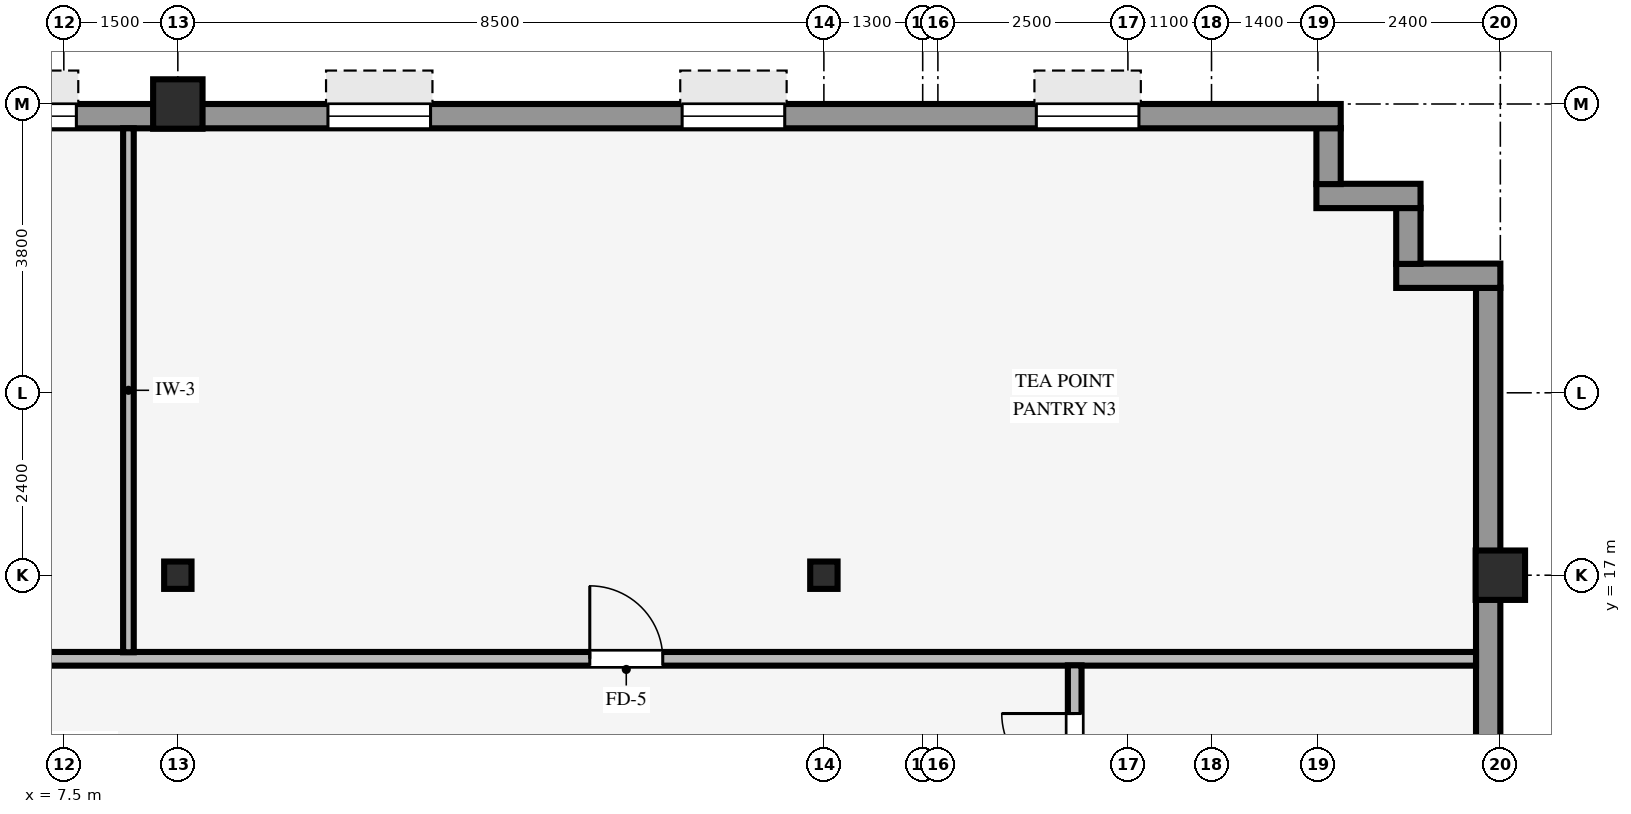
"""IFC4 building model, lengths in metres.
Left out: names, types, materials, properties, quantities, classifications, styles, units other than length and angle.
Written with IfcOpenShell. Run it as: python <this file> out.ifc"""

import sys

from ifc_helpers import new_model, si_unit, direction, frame, frame_2d, origin, origin_2d, place, context, subcontext, project, spatial, rectangle, hollow_rectangle, i_section, extrude, source, transform, mapped, element, fill, save


model = new_model("IFC4")
c1 = context("Model", 3, precision=1e-05, world=origin(), true_north=direction((0.0, 1.0)))
c2 = subcontext(c1, "Body", "Model", "MODEL_VIEW")
j1 = project(units=[si_unit("LENGTHUNIT", "METRE"), si_unit("PLANEANGLEUNIT", "RADIAN")], contexts=[c1])
p1 = place(None, origin())
s1 = spatial("IfcSite", under=j1, at=p1, CompositionType="ELEMENT")
p2 = place(p1, origin())
s2 = spatial("IfcBuilding", under=s1, at=p2, CompositionType="ELEMENT")
p3 = place(p2, frame((0.0, 0.0, 149.4)))
s3 = spatial("IfcBuildingStorey", under=s2, at=p3, CompositionType="ELEMENT", Elevation=149.4)
for number, where, z_axis, x_axis in (
    (1, (26.4, 17.0, 0.0), (0.0, 0.0, 1.0), (1.0, 0.0, 0.0)),
    (2, (9.0, 23.2, 0.0), (0.0, 0.0, 1.0), (1.0, 0.0, 0.0)),
):
    element("IfcColumn", number, at=place(p3, frame(where, z_axis=z_axis, x_axis=x_axis)), inside=s3, PredefinedType="COLUMN", context=c2, shape_type="SweptSolid", body=[
        extrude(hollow_rectangle(XDim=0.65, YDim=0.65, WallThickness=0.04, InnerFilletRadius=0.04, OuterFilletRadius=0.08, at=origin_2d()), origin(), (0.0, 0.0, 1.0), 3.37),
    ])
for number, where, z_axis, x_axis in (
    (3, (9.0, 17.0, 0.0), (0.0, 0.0, 1.0), (1.0, 0.0, 0.0)),
    (4, (17.5, 17.0, 0.0), (0.0, 0.0, 1.0), (1.0, 0.0, 0.0)),
):
    element("IfcColumn", number, at=place(p3, frame(where, z_axis=z_axis, x_axis=x_axis)), inside=s3, PredefinedType="COLUMN", context=c2, shape_type="SweptSolid", body=[
        extrude(i_section(OverallWidth=0.36, OverallDepth=0.36, WebThickness=0.021, FlangeThickness=0.021, FilletRadius=0.018, at=origin_2d()), origin(), (0.0, 0.0, 1.0), 3.37),
    ])
p4 = place(p3, frame((26.24, -20.784, 0.0), z_axis=(0.0, 0.0, 1.0), x_axis=(0.0, 1.0, 0.0)))
e5 = element("IfcWall", 5, at=p4, inside=s3, PredefinedType="STANDARD", context=c2, shape_type="SweptSolid", body=[
    extrude(rectangle(XDim=41.568, YDim=0.32, at=frame_2d((20.784, 0.0))), origin(), (0.0, 0.0, 1.0), 2.705),
])
p5 = place(p4, frame((7.369, 0.0, 0.8)))
e6 = element("IfcOpeningElement", 6, at=p5, cuts=e5, PredefinedType="OPENING", context=c2, shape_type="SweptSolid", body=[
    extrude(rectangle(XDim=2.1, YDim=1.56, at=frame_2d((1.05, 0.78))), frame((0.0, 0.17, 0.0), z_axis=(0.0, -1.0, 0.0), x_axis=(1.0, 0.0, 0.0)), (0.0, 0.0, 1.0), 0.34),
])
p6 = place(p4, frame((12.315, 0.0, 0.8)))
e7 = element("IfcOpeningElement", 7, at=p6, cuts=e5, PredefinedType="OPENING", context=c2, shape_type="SweptSolid", body=[
    extrude(rectangle(XDim=2.1, YDim=1.56, at=frame_2d((1.05, 0.78))), frame((0.0, 0.17, 0.0), z_axis=(0.0, -1.0, 0.0), x_axis=(1.0, 0.0, 0.0)), (0.0, 0.0, 1.0), 0.34),
])
p7 = place(p4, frame((17.261, 0.0, 0.8)))
e8 = element("IfcOpeningElement", 8, at=p7, cuts=e5, PredefinedType="OPENING", context=c2, shape_type="SweptSolid", body=[
    extrude(rectangle(XDim=2.1, YDim=1.56, at=frame_2d((1.05, 0.78))), frame((0.0, 0.17, 0.0), z_axis=(0.0, -1.0, 0.0), x_axis=(1.0, 0.0, 0.0)), (0.0, 0.0, 1.0), 0.34),
])
p8 = place(p4, frame((22.207, 0.0, 0.8)))
e9 = element("IfcOpeningElement", 9, at=p8, cuts=e5, PredefinedType="OPENING", context=c2, shape_type="SweptSolid", body=[
    extrude(rectangle(XDim=2.1, YDim=1.56, at=frame_2d((1.05, 0.78))), frame((0.0, 0.17, 0.0), z_axis=(0.0, -1.0, 0.0), x_axis=(1.0, 0.0, 0.0)), (0.0, 0.0, 1.0), 0.34),
])
p9 = place(p4, frame((27.153, 0.0, 0.8)))
e10 = element("IfcOpeningElement", 10, at=p9, cuts=e5, PredefinedType="OPENING", context=c2, shape_type="SweptSolid", body=[
    extrude(rectangle(XDim=2.1, YDim=1.56, at=frame_2d((1.05, 0.78))), frame((0.0, 0.17, 0.0), z_axis=(0.0, -1.0, 0.0), x_axis=(1.0, 0.0, 0.0)), (0.0, 0.0, 1.0), 0.34),
])
p10 = place(p4, frame((32.099, 0.0, 0.8)))
e11 = element("IfcOpeningElement", 11, at=p10, cuts=e5, PredefinedType="OPENING", context=c2, shape_type="SweptSolid", body=[
    extrude(rectangle(XDim=2.1, YDim=1.56, at=frame_2d((1.05, 0.78))), frame((0.0, 0.17, 0.0), z_axis=(0.0, -1.0, 0.0), x_axis=(1.0, 0.0, 0.0)), (0.0, 0.0, 1.0), 0.34),
])
p11 = place(p3, frame((25.03, 20.94, 0.0), z_axis=(0.0, 0.0, 1.0), x_axis=(1.0, 0.0, 0.0)))
e12 = element("IfcWall", 12, at=p11, inside=s3, PredefinedType="STANDARD", context=c2, shape_type="SweptSolid", body=[
    extrude(rectangle(XDim=1.37, YDim=0.32, at=frame_2d((0.685, 0.0))), origin(), (0.0, 0.0, 1.0), 3.36),
])
p12 = place(p3, frame((25.19, 21.096, 0.0), z_axis=(0.0, 0.0, 1.0), x_axis=(0.0, 1.0, 0.0)))
e13 = element("IfcWall", 13, at=p12, inside=s3, PredefinedType="STANDARD", context=c2, shape_type="SweptSolid", body=[
    extrude(rectangle(XDim=0.738, YDim=0.32, at=frame_2d((0.369, 0.0))), origin(), (0.0, 0.0, 1.0), 3.36),
])
p13 = place(p3, frame((23.98, 21.99, 0.0), z_axis=(0.0, 0.0, 1.0), x_axis=(1.0, 0.0, 0.0)))
e14 = element("IfcWall", 14, at=p13, inside=s3, PredefinedType="STANDARD", context=c2, shape_type="SweptSolid", body=[
    extrude(rectangle(XDim=1.37, YDim=0.32, at=frame_2d((0.685, 0.0))), origin(), (0.0, 0.0, 1.0), 3.36),
])
p14 = place(p3, frame((24.14, 22.146, 0.0), z_axis=(0.0, 0.0, 1.0), x_axis=(0.0, 1.0, 0.0)))
e15 = element("IfcWall", 15, at=p14, inside=s3, PredefinedType="STANDARD", context=c2, shape_type="SweptSolid", body=[
    extrude(rectangle(XDim=0.738, YDim=0.32, at=frame_2d((0.369, 0.0))), origin(), (0.0, 0.0, 1.0), 3.36),
])
p15 = place(p3, frame((-24.3, 23.04, 0.0), z_axis=(0.0, 0.0, 1.0), x_axis=(1.0, 0.0, 0.0)))
e16 = element("IfcWall", 16, at=p15, inside=s3, PredefinedType="STANDARD", context=c2, shape_type="SweptSolid", body=[
    extrude(rectangle(XDim=48.6, YDim=0.32, at=frame_2d((24.3, 0.0))), origin(), (0.0, 0.0, 1.0), 2.705),
])
p16 = place(p15, frame((2.655, 0.0, 0.8)))
e17 = element("IfcOpeningElement", 17, at=p16, cuts=e16, PredefinedType="OPENING", context=c2, shape_type="SweptSolid", body=[
    extrude(rectangle(XDim=1.35, YDim=1.56, at=frame_2d((0.675, 0.78))), frame((0.0, 0.17, 0.0), z_axis=(0.0, -1.0, 0.0), x_axis=(1.0, 0.0, 0.0)), (0.0, 0.0, 1.0), 0.34),
])
p17 = place(p15, frame((7.315, 0.0, 0.8)))
e18 = element("IfcOpeningElement", 18, at=p17, cuts=e16, PredefinedType="OPENING", context=c2, shape_type="SweptSolid", body=[
    extrude(rectangle(XDim=1.35, YDim=1.56, at=frame_2d((0.675, 0.78))), frame((0.0, 0.17, 0.0), z_axis=(0.0, -1.0, 0.0), x_axis=(1.0, 0.0, 0.0)), (0.0, 0.0, 1.0), 0.34),
])
p18 = place(p15, frame((11.975, 0.0, 0.8)))
e19 = element("IfcOpeningElement", 19, at=p18, cuts=e16, PredefinedType="OPENING", context=c2, shape_type="SweptSolid", body=[
    extrude(rectangle(XDim=1.35, YDim=1.56, at=frame_2d((0.675, 0.78))), frame((0.0, 0.17, 0.0), z_axis=(0.0, -1.0, 0.0), x_axis=(1.0, 0.0, 0.0)), (0.0, 0.0, 1.0), 0.34),
])
p19 = place(p15, frame((16.185, 0.0, 0.8)))
e20 = element("IfcOpeningElement", 20, at=p19, cuts=e16, PredefinedType="OPENING", context=c2, shape_type="SweptSolid", body=[
    extrude(rectangle(XDim=1.35, YDim=1.56, at=frame_2d((0.675, 0.78))), frame((0.0, 0.17, 0.0), z_axis=(0.0, -1.0, 0.0), x_axis=(1.0, 0.0, 0.0)), (0.0, 0.0, 1.0), 0.34),
])
p20 = place(p15, frame((21.295, 0.0, 0.8)))
e21 = element("IfcOpeningElement", 21, at=p20, cuts=e16, PredefinedType="OPENING", context=c2, shape_type="SweptSolid", body=[
    extrude(rectangle(XDim=1.35, YDim=1.56, at=frame_2d((0.675, 0.78))), frame((0.0, 0.17, 0.0), z_axis=(0.0, -1.0, 0.0), x_axis=(1.0, 0.0, 0.0)), (0.0, 0.0, 1.0), 0.34),
])
p21 = place(p15, frame((25.955, 0.0, 0.8)))
e22 = element("IfcOpeningElement", 22, at=p21, cuts=e16, PredefinedType="OPENING", context=c2, shape_type="SweptSolid", body=[
    extrude(rectangle(XDim=1.35, YDim=1.56, at=frame_2d((0.675, 0.78))), frame((0.0, 0.17, 0.0), z_axis=(0.0, -1.0, 0.0), x_axis=(1.0, 0.0, 0.0)), (0.0, 0.0, 1.0), 0.34),
])
p22 = place(p15, frame((30.615, 0.0, 0.8)))
e23 = element("IfcOpeningElement", 23, at=p22, cuts=e16, PredefinedType="OPENING", context=c2, shape_type="SweptSolid", body=[
    extrude(rectangle(XDim=1.35, YDim=1.56, at=frame_2d((0.675, 0.78))), frame((0.0, 0.17, 0.0), z_axis=(0.0, -1.0, 0.0), x_axis=(1.0, 0.0, 0.0)), (0.0, 0.0, 1.0), 0.34),
])
p23 = place(p15, frame((35.275, 0.0, 0.8)))
e24 = element("IfcOpeningElement", 24, at=p23, cuts=e16, PredefinedType="OPENING", context=c2, shape_type="SweptSolid", body=[
    extrude(rectangle(XDim=1.35, YDim=1.56, at=frame_2d((0.675, 0.78))), frame((0.0, 0.17, 0.0), z_axis=(0.0, -1.0, 0.0), x_axis=(1.0, 0.0, 0.0)), (0.0, 0.0, 1.0), 0.34),
])
p24 = place(p15, frame((39.935, 0.0, 0.8)))
e25 = element("IfcOpeningElement", 25, at=p24, cuts=e16, PredefinedType="OPENING", context=c2, shape_type="SweptSolid", body=[
    extrude(rectangle(XDim=1.35, YDim=1.56, at=frame_2d((0.675, 0.78))), frame((0.0, 0.17, 0.0), z_axis=(0.0, -1.0, 0.0), x_axis=(1.0, 0.0, 0.0)), (0.0, 0.0, 1.0), 0.34),
])
p25 = place(p15, frame((44.595, 0.0, 0.8)))
e26 = element("IfcOpeningElement", 26, at=p25, cuts=e16, PredefinedType="OPENING", context=c2, shape_type="SweptSolid", body=[
    extrude(rectangle(XDim=1.35, YDim=1.56, at=frame_2d((0.675, 0.78))), frame((0.0, 0.17, 0.0), z_axis=(0.0, -1.0, 0.0), x_axis=(1.0, 0.0, 0.0)), (0.0, 0.0, 1.0), 0.34),
])
p26 = place(p3, frame((-26.08, 15.9, 0.0), z_axis=(0.0, 0.0, 1.0), x_axis=(1.0, 0.0, 0.0)))
e27 = element("IfcWall", 27, at=p26, inside=s3, PredefinedType="PARTITIONING", context=c2, shape_type="SweptSolid", body=[
    extrude(rectangle(XDim=52.16, YDim=0.18, at=frame_2d((26.08, 0.0))), origin(), (0.0, 0.0, 1.0), 3.36),
])
p27 = place(p26, frame((26.72, 0.0, 0.0)))
e28 = element("IfcOpeningElement", 28, at=p27, cuts=e27, PredefinedType="OPENING", context=c2, shape_type="SweptSolid", body=[
    extrude(rectangle(XDim=0.96, YDim=2.1, at=frame_2d((0.48, 1.05))), frame((0.0, 0.1, 0.0), z_axis=(0.0, -1.0, 0.0), x_axis=(1.0, 0.0, 0.0)), (0.0, 0.0, 1.0), 0.2),
])
p28 = place(p26, frame((40.5, 0.0, 0.0)))
e29 = element("IfcOpeningElement", 29, at=p28, cuts=e27, PredefinedType="OPENING", context=c2, shape_type="SweptSolid", body=[
    extrude(rectangle(XDim=0.96, YDim=2.1, at=frame_2d((0.48, 1.05))), frame((0.0, 0.1, 0.0), z_axis=(0.0, -1.0, 0.0), x_axis=(1.0, 0.0, 0.0)), (0.0, 0.0, 1.0), 0.2),
])
p29 = place(p26, frame((13.61, 0.0, 0.0)))
e30 = element("IfcOpeningElement", 30, at=p29, cuts=e27, PredefinedType="OPENING", context=c2, shape_type="SweptSolid", body=[
    extrude(rectangle(XDim=0.96, YDim=2.1, at=frame_2d((0.48, 1.05))), frame((0.0, 0.1, 0.0), z_axis=(0.0, -1.0, 0.0), x_axis=(1.0, 0.0, 0.0)), (0.0, 0.0, 1.0), 0.2),
])
p30 = place(p3, frame((8.35, 15.986, 0.0), z_axis=(0.0, 0.0, 1.0), x_axis=(0.0, 1.0, 0.0)))
e31 = element("IfcWall", 31, at=p30, inside=s3, PredefinedType="PARTITIONING", context=c2, shape_type="SweptSolid", body=[
    extrude(rectangle(XDim=6.894, YDim=0.14, at=frame_2d((3.447, 0.0))), origin(), (0.0, 0.0, 1.0), 3.36),
])
p31 = place(p3, frame((20.8, 13.586, 0.0), z_axis=(0.0, 0.0, 1.0), x_axis=(0.0, 1.0, 0.0)))
e32 = element("IfcWall", 32, at=p31, inside=s3, PredefinedType="PARTITIONING", context=c2, shape_type="SweptSolid", body=[
    extrude(rectangle(XDim=2.228, YDim=0.18, at=frame_2d((1.114, 0.0))), origin(), (0.0, 0.0, 1.0), 3.36),
])
p32 = place(p31, frame((0.634, 0.0, 0.0)))
e33 = element("IfcOpeningElement", 33, at=p32, cuts=e32, PredefinedType="OPENING", context=c2, shape_type="SweptSolid", body=[
    extrude(rectangle(XDim=0.96, YDim=2.1, at=frame_2d((0.48, 1.05))), frame((0.0, 0.1, 0.0), z_axis=(0.0, -1.0, 0.0), x_axis=(1.0, 0.0, 0.0)), (0.0, 0.0, 1.0), 0.2),
])
m1 = source(origin(), c2, "Body", "SweptSolid", [
    extrude(rectangle(XDim=1.35, YDim=1.56, at=frame_2d((0.675, 0.78))), frame((0.0, 0.03, 0.0), z_axis=(0.0, -1.0, 0.0), x_axis=(1.0, 0.0, 0.0)), (0.0, 0.0, 1.0), 0.06),
])
p33 = place(p22, origin())
e34 = element("IfcWindow", 34, at=p33, inside=s3, PartitioningType="SINGLE_PANEL", PredefinedType="WINDOW", context=c2, shape_type="MappedRepresentation", body=[
    mapped(m1, transform((0.0, 0.0, 0.0), scale=1.0)),
])
fill(e23, e34)
p34 = place(p23, origin())
e35 = element("IfcWindow", 35, at=p34, inside=s3, PartitioningType="SINGLE_PANEL", PredefinedType="WINDOW", context=c2, shape_type="MappedRepresentation", body=[
    mapped(m1, transform((0.0, 0.0, 0.0), scale=1.0)),
])
fill(e24, e35)
p35 = place(p24, origin())
e36 = element("IfcWindow", 36, at=p35, inside=s3, PartitioningType="SINGLE_PANEL", PredefinedType="WINDOW", context=c2, shape_type="MappedRepresentation", body=[
    mapped(m1, transform((0.0, 0.0, 0.0), scale=1.0)),
])
fill(e25, e36)
p36 = place(p25, origin())
e37 = element("IfcWindow", 37, at=p36, inside=s3, PartitioningType="SINGLE_PANEL", PredefinedType="WINDOW", context=c2, shape_type="MappedRepresentation", body=[
    mapped(m1, transform((0.0, 0.0, 0.0), scale=1.0)),
])
fill(e26, e37)
m2 = source(origin(), c2, "Body", "SweptSolid", [
    extrude(rectangle(XDim=0.96, YDim=2.1, at=frame_2d((0.48, 1.05))), frame((0.0, 0.025, 0.0), z_axis=(0.0, -1.0, 0.0), x_axis=(1.0, 0.0, 0.0)), (0.0, 0.0, 1.0), 0.05),
])
p37 = place(p28, origin())
e38 = element("IfcDoor", 38, at=p37, inside=s3, OperationType="SINGLE_SWING_LEFT", PredefinedType="DOOR", context=c2, shape_type="MappedRepresentation", body=[
    mapped(m2, transform((0.0, 0.0, 0.0), scale=1.0)),
])
fill(e29, e38)
p38 = place(p32, origin())
e39 = element("IfcDoor", 39, at=p38, inside=s3, OperationType="SINGLE_SWING_RIGHT", PredefinedType="DOOR", context=c2, shape_type="MappedRepresentation", body=[
    mapped(m2, transform((0.0, 0.0, 0.0), scale=1.0)),
])
fill(e33, e39)
save(model, sys.argv[1])
